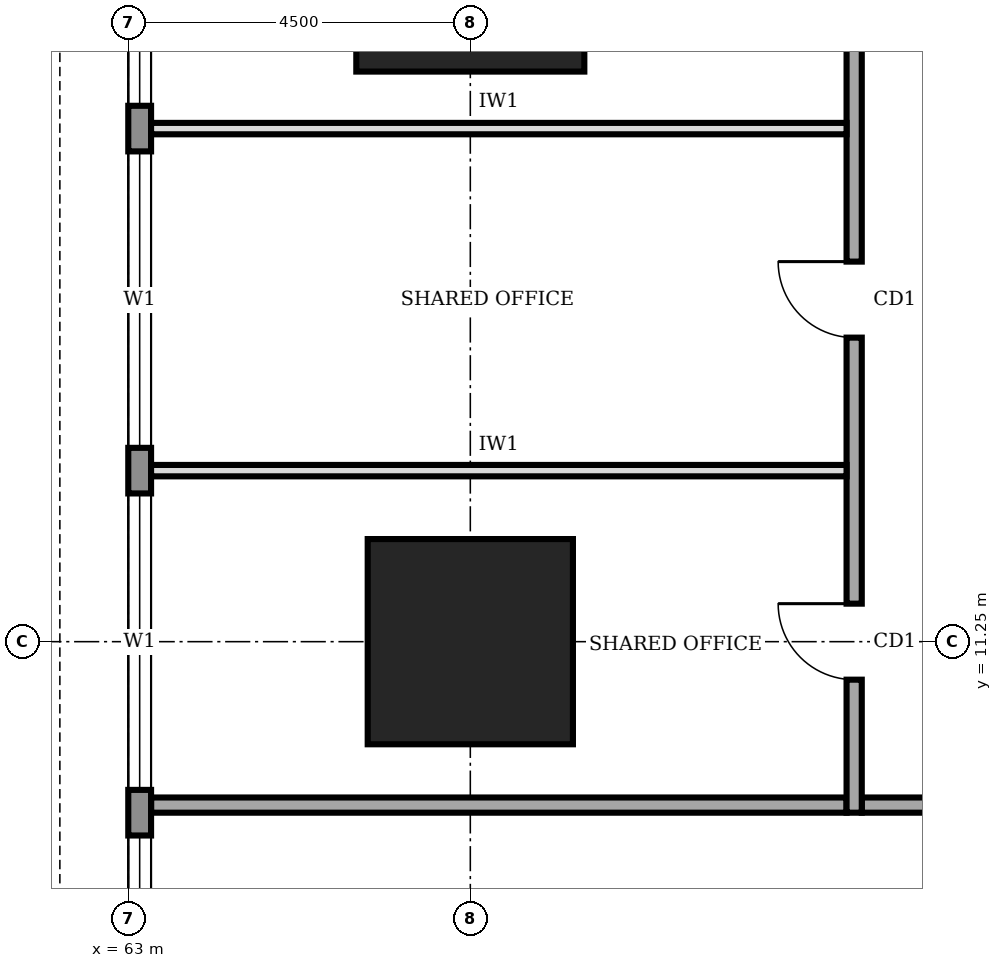
"""IFC4 building model, lengths in metres.
Left out: names, types, materials, properties, quantities, classifications, styles, units other than length and angle.
Written with IfcOpenShell. Run it as: python <this file> out.ifc"""

import sys

from ifc_helpers import new_model, si_unit, direction, frame, frame_2d, origin, origin_2d, place, context, subcontext, project, spatial, rectangle, extrude, element, fill, save


model = new_model("IFC4")
c1 = context("Model", 3, precision=1e-05, world=origin(), true_north=direction((0.0, 1.0)))
c2 = subcontext(c1, "Body", "Model", "MODEL_VIEW")
j1 = project(units=[si_unit("LENGTHUNIT", "METRE"), si_unit("PLANEANGLEUNIT", "RADIAN")], contexts=[c1])
p1 = place(None, origin())
s1 = spatial("IfcSite", under=j1, at=p1, CompositionType="ELEMENT")
p2 = place(p1, origin())
s2 = spatial("IfcBuilding", under=s1, at=p2, CompositionType="ELEMENT")
p3 = place(p2, frame((0.0, 0.0, 29.0)))
s3 = spatial("IfcBuildingStorey", under=s2, at=p3, CompositionType="ELEMENT", Elevation=29.0)
p4 = place(p3, frame((67.5, 11.25, 0.0), z_axis=(0.0, 0.0, 1.0), x_axis=(1.0, 0.0, 0.0)))
e1 = element("IfcColumn", 1, at=p4, inside=s3, PredefinedType="COLUMN", context=c2, shape_type="SweptSolid", body=[
    extrude(rectangle(XDim=2.7, YDim=2.7, at=origin_2d()), origin(), (0.0, 0.0, 1.0), 4.0),
])
p5 = place(p3, frame((67.5, 20.25, 0.0), z_axis=(0.0, 0.0, 1.0), x_axis=(1.0, 0.0, 0.0)))
e2 = element("IfcColumn", 2, at=p5, inside=s3, PredefinedType="COLUMN", context=c2, shape_type="SweptSolid", body=[
    extrude(rectangle(XDim=3.0, YDim=3.0, at=origin_2d()), origin(), (0.0, 0.0, 1.0), 4.0),
])
p6 = place(p3, frame((63.15, 35.98, 0.0), z_axis=(0.0, 0.0, 1.0), x_axis=(0.0, -1.0, 0.0)))
e3 = element("IfcWall", 3, at=p6, inside=s3, PredefinedType="STANDARD", context=c2, shape_type="SweptSolid", body=[
    extrude(rectangle(XDim=31.46, YDim=0.3, at=frame_2d((15.73, 0.0))), origin(), (0.0, 0.0, 1.0), 3.75),
])
p7 = place(p6, frame((27.28, 0.0, 0.9)))
e4 = element("IfcOpeningElement", 4, at=p7, cuts=e3, PredefinedType="OPENING", context=c2, shape_type="SweptSolid", body=[
    extrude(rectangle(XDim=3.9, YDim=2.2, at=frame_2d((1.95, 1.1))), frame((0.0, 0.16, 0.0), z_axis=(0.0, -1.0, 0.0), x_axis=(1.0, 0.0, 0.0)), (0.0, 0.0, 1.0), 0.32),
])
p8 = place(p6, frame((22.78, 0.0, 0.9)))
e5 = element("IfcOpeningElement", 5, at=p8, cuts=e3, PredefinedType="OPENING", context=c2, shape_type="SweptSolid", body=[
    extrude(rectangle(XDim=3.9, YDim=2.2, at=frame_2d((1.95, 1.1))), frame((0.0, 0.16, 0.0), z_axis=(0.0, -1.0, 0.0), x_axis=(1.0, 0.0, 0.0)), (0.0, 0.0, 1.0), 0.32),
])
p9 = place(p6, frame((18.28, 0.0, 0.9)))
e6 = element("IfcOpeningElement", 6, at=p9, cuts=e3, PredefinedType="OPENING", context=c2, shape_type="SweptSolid", body=[
    extrude(rectangle(XDim=3.9, YDim=2.2, at=frame_2d((1.95, 1.1))), frame((0.0, 0.16, 0.0), z_axis=(0.0, -1.0, 0.0), x_axis=(1.0, 0.0, 0.0)), (0.0, 0.0, 1.0), 0.32),
])
p10 = place(p6, frame((13.78, 0.0, 0.9)))
e7 = element("IfcOpeningElement", 7, at=p10, cuts=e3, PredefinedType="OPENING", context=c2, shape_type="SweptSolid", body=[
    extrude(rectangle(XDim=3.9, YDim=2.2, at=frame_2d((1.95, 1.1))), frame((0.0, 0.16, 0.0), z_axis=(0.0, -1.0, 0.0), x_axis=(1.0, 0.0, 0.0)), (0.0, 0.0, 1.0), 0.32),
])
p11 = place(p6, frame((9.28, 0.0, 0.9)))
e8 = element("IfcOpeningElement", 8, at=p11, cuts=e3, PredefinedType="OPENING", context=c2, shape_type="SweptSolid", body=[
    extrude(rectangle(XDim=3.9, YDim=2.2, at=frame_2d((1.95, 1.1))), frame((0.0, 0.16, 0.0), z_axis=(0.0, -1.0, 0.0), x_axis=(1.0, 0.0, 0.0)), (0.0, 0.0, 1.0), 0.32),
])
p12 = place(p6, frame((4.78, 0.0, 0.9)))
e9 = element("IfcOpeningElement", 9, at=p12, cuts=e3, PredefinedType="OPENING", context=c2, shape_type="SweptSolid", body=[
    extrude(rectangle(XDim=3.9, YDim=2.2, at=frame_2d((1.95, 1.1))), frame((0.0, 0.16, 0.0), z_axis=(0.0, -1.0, 0.0), x_axis=(1.0, 0.0, 0.0)), (0.0, 0.0, 1.0), 0.32),
])
p13 = place(p3, frame((72.65, 9.1, 0.0), z_axis=(0.0, 0.0, 1.0), x_axis=(1.0, 0.0, 0.0)))
e10 = element("IfcWall", 10, at=p13, inside=s3, PredefinedType="SOLIDWALL", context=c2, shape_type="SweptSolid", body=[
    extrude(rectangle(XDim=16.9, YDim=0.2, at=frame_2d((8.45, 0.0))), origin(), (0.0, 0.0, 1.0), 3.75),
])
p14 = place(p13, frame((0.925, 0.0, 0.0)))
e11 = element("IfcOpeningElement", 11, at=p14, cuts=e10, PredefinedType="OPENING", context=c2, shape_type="SweptSolid", body=[
    extrude(rectangle(XDim=1.8, YDim=2.1, at=frame_2d((0.9, 1.05))), frame((0.0, 0.11, 0.0), z_axis=(0.0, -1.0, 0.0), x_axis=(1.0, 0.0, 0.0)), (0.0, 0.0, 1.0), 0.22),
])
p15 = place(p13, frame((7.85, 0.0, 0.0)))
e12 = element("IfcOpeningElement", 12, at=p15, cuts=e10, PredefinedType="OPENING", context=c2, shape_type="SweptSolid", body=[
    extrude(rectangle(XDim=1.0, YDim=2.1, at=frame_2d((0.5, 1.05))), frame((0.0, 0.11, 0.0), z_axis=(0.0, -1.0, 0.0), x_axis=(1.0, 0.0, 0.0)), (0.0, 0.0, 1.0), 0.22),
])
p16 = place(p13, frame((13.975, 0.0, 0.0)))
e13 = element("IfcOpeningElement", 13, at=p16, cuts=e10, PredefinedType="OPENING", context=c2, shape_type="SweptSolid", body=[
    extrude(rectangle(XDim=1.8, YDim=2.1, at=frame_2d((0.9, 1.05))), frame((0.0, 0.11, 0.0), z_axis=(0.0, -1.0, 0.0), x_axis=(1.0, 0.0, 0.0)), (0.0, 0.0, 1.0), 0.22),
])
p17 = place(p3, frame((72.55, 32.8, 0.0), z_axis=(0.0, 0.0, 1.0), x_axis=(0.0, -1.0, 0.0)))
e14 = element("IfcWall", 14, at=p17, inside=s3, PredefinedType="SOLIDWALL", context=c2, shape_type="SweptSolid", body=[
    extrude(rectangle(XDim=23.8, YDim=0.2, at=frame_2d((11.9, 0.0))), origin(), (0.0, 0.0, 1.0), 3.75),
])
p18 = place(p17, frame((21.05, 0.0, 0.0)))
e15 = element("IfcOpeningElement", 15, at=p18, cuts=e14, PredefinedType="OPENING", context=c2, shape_type="SweptSolid", body=[
    extrude(rectangle(XDim=1.0, YDim=2.1, at=frame_2d((0.5, 1.05))), frame((0.0, 0.11, 0.0), z_axis=(0.0, -1.0, 0.0), x_axis=(1.0, 0.0, 0.0)), (0.0, 0.0, 1.0), 0.22),
])
p19 = place(p17, frame((16.55, 0.0, 0.0)))
e16 = element("IfcOpeningElement", 16, at=p19, cuts=e14, PredefinedType="OPENING", context=c2, shape_type="SweptSolid", body=[
    extrude(rectangle(XDim=1.0, YDim=2.1, at=frame_2d((0.5, 1.05))), frame((0.0, 0.11, 0.0), z_axis=(0.0, -1.0, 0.0), x_axis=(1.0, 0.0, 0.0)), (0.0, 0.0, 1.0), 0.22),
])
p20 = place(p17, frame((12.05, 0.0, 0.0)))
e17 = element("IfcOpeningElement", 17, at=p20, cuts=e14, PredefinedType="OPENING", context=c2, shape_type="SweptSolid", body=[
    extrude(rectangle(XDim=1.0, YDim=2.1, at=frame_2d((0.5, 1.05))), frame((0.0, 0.11, 0.0), z_axis=(0.0, -1.0, 0.0), x_axis=(1.0, 0.0, 0.0)), (0.0, 0.0, 1.0), 0.22),
])
p21 = place(p17, frame((7.55, 0.0, 0.0)))
e18 = element("IfcOpeningElement", 18, at=p21, cuts=e14, PredefinedType="OPENING", context=c2, shape_type="SweptSolid", body=[
    extrude(rectangle(XDim=1.0, YDim=2.1, at=frame_2d((0.5, 1.05))), frame((0.0, 0.11, 0.0), z_axis=(0.0, -1.0, 0.0), x_axis=(1.0, 0.0, 0.0)), (0.0, 0.0, 1.0), 0.22),
])
p22 = place(p17, frame((2.3, 0.0, 0.0)))
e19 = element("IfcOpeningElement", 19, at=p22, cuts=e14, PredefinedType="OPENING", context=c2, shape_type="SweptSolid", body=[
    extrude(rectangle(XDim=1.0, YDim=2.1, at=frame_2d((0.5, 1.05))), frame((0.0, 0.11, 0.0), z_axis=(0.0, -1.0, 0.0), x_axis=(1.0, 0.0, 0.0)), (0.0, 0.0, 1.0), 0.22),
])
p23 = place(p3, frame((63.3, 9.1, 0.0), z_axis=(0.0, 0.0, 1.0), x_axis=(1.0, 0.0, 0.0)))
e20 = element("IfcWall", 20, at=p23, inside=s3, PredefinedType="SOLIDWALL", context=c2, shape_type="SweptSolid", body=[
    extrude(rectangle(XDim=9.15, YDim=0.2, at=frame_2d((4.575, 0.0))), origin(), (0.0, 0.0, 1.0), 3.75),
])
for number, where, z_axis, x_axis in (
    (21, (63.3, 13.5, 0.0), (0.0, 0.0, 1.0), (1.0, 0.0, 0.0)),
    (22, (63.3, 18.0, 0.0), (0.0, 0.0, 1.0), (1.0, 0.0, 0.0)),
):
    element("IfcWall", number, at=place(p3, frame(where, z_axis=z_axis, x_axis=x_axis)), inside=s3, PredefinedType="PARTITIONING", context=c2, shape_type="SweptSolid", body=[
        extrude(rectangle(XDim=9.15, YDim=0.15, at=frame_2d((4.575, 0.0))), origin(), (0.0, 0.0, 1.0), 3.75),
    ])
p24 = place(p7, origin())
e23 = element("IfcWindow", 23, at=p24, inside=s3, PartitioningType="SINGLE_PANEL", PredefinedType="WINDOW", context=c2, shape_type="SweptSolid", body=[
    extrude(rectangle(XDim=3.9, YDim=2.2, at=frame_2d((1.95, 1.1))), frame((0.0, 0.03, 0.0), z_axis=(0.0, -1.0, 0.0), x_axis=(1.0, 0.0, 0.0)), (0.0, 0.0, 1.0), 0.06),
])
fill(e4, e23)
p25 = place(p8, origin())
e24 = element("IfcWindow", 24, at=p25, inside=s3, PartitioningType="SINGLE_PANEL", PredefinedType="WINDOW", context=c2, shape_type="SweptSolid", body=[
    extrude(rectangle(XDim=3.9, YDim=2.2, at=frame_2d((1.95, 1.1))), frame((0.0, 0.03, 0.0), z_axis=(0.0, -1.0, 0.0), x_axis=(1.0, 0.0, 0.0)), (0.0, 0.0, 1.0), 0.06),
])
fill(e5, e24)
p26 = place(p9, origin())
e25 = element("IfcWindow", 25, at=p26, inside=s3, PartitioningType="SINGLE_PANEL", PredefinedType="WINDOW", context=c2, shape_type="SweptSolid", body=[
    extrude(rectangle(XDim=3.9, YDim=2.2, at=frame_2d((1.95, 1.1))), frame((0.0, 0.03, 0.0), z_axis=(0.0, -1.0, 0.0), x_axis=(1.0, 0.0, 0.0)), (0.0, 0.0, 1.0), 0.06),
])
fill(e6, e25)
p27 = place(p10, origin())
e26 = element("IfcWindow", 26, at=p27, inside=s3, PartitioningType="SINGLE_PANEL", PredefinedType="WINDOW", context=c2, shape_type="SweptSolid", body=[
    extrude(rectangle(XDim=3.9, YDim=2.2, at=frame_2d((1.95, 1.1))), frame((0.0, 0.03, 0.0), z_axis=(0.0, -1.0, 0.0), x_axis=(1.0, 0.0, 0.0)), (0.0, 0.0, 1.0), 0.06),
])
fill(e7, e26)
p28 = place(p18, frame((1.0, 0.0, 0.0), z_axis=(0.0, 0.0, 1.0), x_axis=(-1.0, 0.0, 0.0)))
e27 = element("IfcDoor", 27, at=p28, inside=s3, OperationType="SINGLE_SWING_RIGHT", PredefinedType="DOOR", context=c2, shape_type="SweptSolid", body=[
    extrude(rectangle(XDim=1.0, YDim=2.1, at=frame_2d((0.5, 1.05))), frame((0.0, 0.025, 0.0), z_axis=(0.0, -1.0, 0.0), x_axis=(1.0, 0.0, 0.0)), (0.0, 0.0, 1.0), 0.05),
])
fill(e15, e27)
p29 = place(p19, frame((1.0, 0.0, 0.0), z_axis=(0.0, 0.0, 1.0), x_axis=(-1.0, 0.0, 0.0)))
e28 = element("IfcDoor", 28, at=p29, inside=s3, OperationType="SINGLE_SWING_RIGHT", PredefinedType="DOOR", context=c2, shape_type="SweptSolid", body=[
    extrude(rectangle(XDim=1.0, YDim=2.1, at=frame_2d((0.5, 1.05))), frame((0.0, 0.025, 0.0), z_axis=(0.0, -1.0, 0.0), x_axis=(1.0, 0.0, 0.0)), (0.0, 0.0, 1.0), 0.05),
])
fill(e16, e28)
save(model, sys.argv[1])
